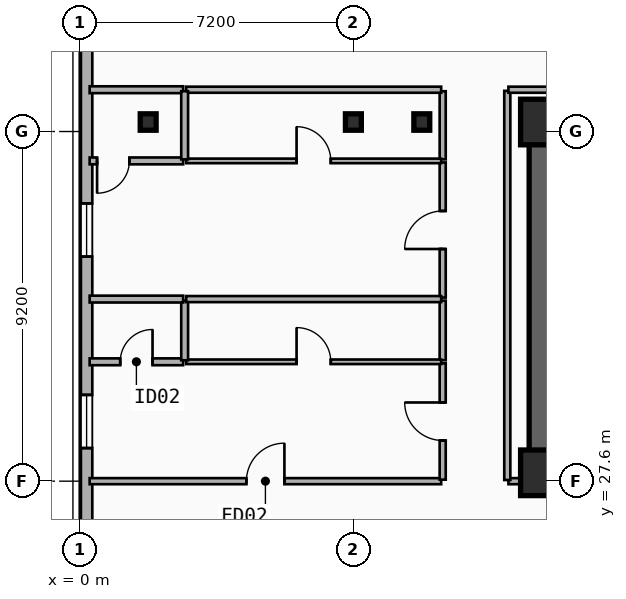
"""IFC4 building model, lengths in metres.
Left out: names, types, materials, properties, quantities, classifications, styles, units other than length and angle.
Written with IfcOpenShell. Run it as: python <this file> out.ifc"""

import sys

from ifc_helpers import new_model, si_unit, direction, frame, frame_2d, origin, origin_2d, place, context, subcontext, project, spatial, rectangle, i_section, extrude, element, fill, save


model = new_model("IFC4")
c1 = context("Model", 3, precision=1e-05, world=origin(), true_north=direction((0.0, 1.0)))
c2 = subcontext(c1, "Body", "Model", "MODEL_VIEW")
j1 = project(units=[si_unit("LENGTHUNIT", "METRE"), si_unit("PLANEANGLEUNIT", "RADIAN")], contexts=[c1])
p1 = place(None, origin())
s1 = spatial("IfcSite", under=j1, at=p1, CompositionType="ELEMENT")
p2 = place(p1, origin())
s2 = spatial("IfcBuilding", under=s1, at=p2, CompositionType="ELEMENT")
p3 = place(p2, frame((0.0, 0.0, 125.8)))
s3 = spatial("IfcBuildingStorey", under=s2, at=p3, CompositionType="ELEMENT", Elevation=125.8)
p4 = place(p3, frame((12.15, 37.05, 0.0), z_axis=(0.0, 0.0, 1.0), x_axis=(1.0, 0.0, 0.0)))
e1 = element("IfcWall", 1, at=p4, inside=s3, PredefinedType="SHEAR", context=c2, shape_type="SweptSolid", body=[
    extrude(rectangle(XDim=33.23, YDim=0.65, at=frame_2d((16.615, 0.0))), origin(), (0.0, 0.0, 1.0), 3.5),
])
p5 = place(p3, frame((21.18, 27.82, 0.0), z_axis=(0.0, 0.0, 1.0), x_axis=(-1.0, 0.0, 0.0)))
e2 = element("IfcWall", 2, at=p5, inside=s3, PredefinedType="SHEAR", context=c2, shape_type="SweptSolid", body=[
    extrude(rectangle(XDim=9.03, YDim=0.65, at=frame_2d((4.515, 0.0))), origin(), (0.0, 0.0, 1.0), 3.5),
])
p6 = place(p5, frame((2.68, 0.0, 0.0)))
e3 = element("IfcOpeningElement", 3, at=p6, cuts=e2, PredefinedType="OPENING", context=c2, shape_type="SweptSolid", body=[
    extrude(rectangle(XDim=1.1, YDim=2.15, at=frame_2d((0.55, 1.075))), frame((0.0, 0.335, 0.0), z_axis=(0.0, -1.0, 0.0), x_axis=(1.0, 0.0, 0.0)), (0.0, 0.0, 1.0), 0.67),
])
p7 = place(p3, frame((12.15, 28.145, 0.0), z_axis=(0.0, 0.0, 1.0), x_axis=(0.0, 1.0, 0.0)))
e4 = element("IfcWall", 4, at=p7, inside=s3, PredefinedType="SHEAR", context=c2, shape_type="SweptSolid", body=[
    extrude(rectangle(XDim=8.58, YDim=0.65, at=frame_2d((4.29, 0.0))), origin(), (0.0, 0.0, 1.0), 3.5),
])
for number, where, z_axis, x_axis in (
    (5, (12.2, 27.82, 0.0), (0.0, 0.0, 1.0), (1.0, 0.0, 0.0)),
    (6, (12.2, 37.05, 0.0), (0.0, 0.0, 1.0), (1.0, 0.0, 0.0)),
):
    element("IfcColumn", number, at=place(p3, frame(where, z_axis=z_axis, x_axis=x_axis)), inside=s3, PredefinedType="COLUMN", context=c2, shape_type="SweptSolid", body=[
        extrude(rectangle(XDim=1.2, YDim=1.2, at=origin_2d()), origin(), (0.0, 0.0, 1.0), 3.5),
    ])
for number, where, z_axis, x_axis in (
    (7, (9.0, 37.05, 0.0), (0.0, 0.0, 1.0), (1.0, 0.0, 0.0)),
    (8, (1.8, 37.05, 0.0), (0.0, 0.0, 1.0), (1.0, 0.0, 0.0)),
    (9, (7.2, 37.05, 0.0), (0.0, 0.0, 1.0), (1.0, 0.0, 0.0)),
):
    element("IfcColumn", number, at=place(p3, frame(where, z_axis=z_axis, x_axis=x_axis)), inside=s3, PredefinedType="COLUMN", context=c2, shape_type="SweptSolid", body=[
        extrude(i_section(OverallWidth=0.418, OverallDepth=0.432, WebThickness=0.035, FlangeThickness=0.056, FilletRadius=0.015, at=origin_2d()), origin(), (0.0, 0.0, 1.0), 3.5),
    ])
p8 = place(p3, frame((0.18, 21.0, 0.0), z_axis=(0.0, 0.0, 1.0), x_axis=(0.0, 1.0, 0.0)))
e10 = element("IfcWall", 10, at=p8, inside=s3, PredefinedType="SOLIDWALL", context=c2, shape_type="SweptSolid", body=[
    extrude(rectangle(XDim=18.0, YDim=0.3, at=frame_2d((9.0, 0.0))), origin(), (0.0, 0.0, 1.0), 3.24),
])
p9 = place(p8, frame((7.47, 0.0, 0.48)))
e11 = element("IfcOpeningElement", 11, at=p9, cuts=e10, PredefinedType="OPENING", context=c2, shape_type="SweptSolid", body=[
    extrude(rectangle(XDim=1.4, YDim=1.8, at=frame_2d((0.7, 0.9))), frame((0.0, 0.16, 0.0), z_axis=(0.0, -1.0, 0.0), x_axis=(1.0, 0.0, 0.0)), (0.0, 0.0, 1.0), 0.32),
])
p10 = place(p8, frame((12.509, 0.0, 0.48)))
e12 = element("IfcOpeningElement", 12, at=p10, cuts=e10, PredefinedType="OPENING", context=c2, shape_type="SweptSolid", body=[
    extrude(rectangle(XDim=1.4, YDim=1.8, at=frame_2d((0.7, 0.9))), frame((0.0, 0.16, 0.0), z_axis=(0.0, -1.0, 0.0), x_axis=(1.0, 0.0, 0.0)), (0.0, 0.0, 1.0), 0.32),
])
p11 = place(p8, frame((0.32, 0.0, 0.65)))
e13 = element("IfcOpeningElement", 13, at=p11, cuts=e10, PredefinedType="OPENING", context=c2, shape_type="SweptSolid", body=[
    extrude(rectangle(XDim=1.4, YDim=1.8, at=frame_2d((0.7, 0.9))), frame((0.0, 0.16, 0.0), z_axis=(0.0, -1.0, 0.0), x_axis=(1.0, 0.0, 0.0)), (0.0, 0.0, 1.0), 0.32),
])
p12 = place(p3, frame((0.26, 27.6, 0.0), z_axis=(0.0, 0.0, 1.0), x_axis=(1.0, 0.0, 0.0)))
e14 = element("IfcWall", 14, at=p12, inside=s3, PredefinedType="PARTITIONING", context=c2, shape_type="SweptSolid", body=[
    extrude(rectangle(XDim=9.25, YDim=0.16, at=frame_2d((4.625, 0.0))), origin(), (0.0, 0.0, 1.0), 2.57),
])
p13 = place(p12, frame((4.125, 0.0, 0.0)))
e15 = element("IfcOpeningElement", 15, at=p13, cuts=e14, PredefinedType="OPENING", context=c2, shape_type="SweptSolid", body=[
    extrude(rectangle(XDim=1.0, YDim=2.15, at=frame_2d((0.5, 1.075))), frame((0.0, 0.09, 0.0), z_axis=(0.0, -1.0, 0.0), x_axis=(1.0, 0.0, 0.0)), (0.0, 0.0, 1.0), 0.18),
])
p14 = place(p3, frame((9.55, 27.64, 0.0), z_axis=(0.0, 0.0, 1.0), x_axis=(0.0, 1.0, 0.0)))
e16 = element("IfcWall", 16, at=p14, inside=s3, PredefinedType="PARTITIONING", context=c2, shape_type="SweptSolid", body=[
    extrude(rectangle(XDim=3.061, YDim=0.16, at=frame_2d((1.531, 0.0))), origin(), (0.0, 0.0, 1.0), 3.24),
])
p15 = place(p14, frame((1.031, 0.0, 0.0)))
e17 = element("IfcOpeningElement", 17, at=p15, cuts=e16, PredefinedType="OPENING", context=c2, shape_type="SweptSolid", body=[
    extrude(rectangle(XDim=1.0, YDim=2.15, at=frame_2d((0.5, 1.075))), frame((0.0, 0.09, 0.0), z_axis=(0.0, -1.0, 0.0), x_axis=(1.0, 0.0, 0.0)), (0.0, 0.0, 1.0), 0.18),
])
p16 = place(p3, frame((9.55, 30.781, 0.0), z_axis=(0.0, 0.0, 1.0), x_axis=(0.0, 1.0, 0.0)))
e18 = element("IfcWall", 18, at=p16, inside=s3, PredefinedType="PARTITIONING", context=c2, shape_type="SweptSolid", body=[
    extrude(rectangle(XDim=1.57, YDim=0.16, at=frame_2d((0.785, 0.0))), origin(), (0.0, 0.0, 1.0), 3.24),
])
p17 = place(p3, frame((9.55, 32.431, 0.0), z_axis=(0.0, 0.0, 1.0), x_axis=(0.0, 1.0, 0.0)))
e19 = element("IfcWall", 19, at=p17, inside=s3, PredefinedType="PARTITIONING", context=c2, shape_type="SweptSolid", body=[
    extrude(rectangle(XDim=3.556, YDim=0.16, at=frame_2d((1.778, 0.0))), origin(), (0.0, 0.0, 1.0), 3.24),
])
p18 = place(p17, frame((1.278, 0.0, 0.0)))
e20 = element("IfcOpeningElement", 20, at=p18, cuts=e19, PredefinedType="OPENING", context=c2, shape_type="SweptSolid", body=[
    extrude(rectangle(XDim=1.0, YDim=2.15, at=frame_2d((0.5, 1.075))), frame((0.0, 0.09, 0.0), z_axis=(0.0, -1.0, 0.0), x_axis=(1.0, 0.0, 0.0)), (0.0, 0.0, 1.0), 0.18),
])
p19 = place(p3, frame((9.55, 36.067, 0.0), z_axis=(0.0, 0.0, 1.0), x_axis=(0.0, 1.0, 0.0)))
e21 = element("IfcWall", 21, at=p19, inside=s3, PredefinedType="PARTITIONING", context=c2, shape_type="SweptSolid", body=[
    extrude(rectangle(XDim=1.793, YDim=0.16, at=frame_2d((0.896, 0.0))), origin(), (0.0, 0.0, 1.0), 2.72),
])
p20 = place(p3, frame((0.26, 37.9, 0.0), z_axis=(0.0, 0.0, 1.0), x_axis=(1.0, 0.0, 0.0)))
e22 = element("IfcWall", 22, at=p20, inside=s3, PredefinedType="PLUMBINGWALL", context=c2, shape_type="SweptSolid", body=[
    extrude(rectangle(XDim=2.46, YDim=0.18, at=frame_2d((1.23, 0.0))), origin(), (0.0, 0.0, 1.0), 3.24),
])
p21 = place(p3, frame((2.8, 37.9, 0.0), z_axis=(0.0, 0.0, 1.0), x_axis=(1.0, 0.0, 0.0)))
e23 = element("IfcWall", 23, at=p21, inside=s3, PredefinedType="PARTITIONING", context=c2, shape_type="SweptSolid", body=[
    extrude(rectangle(XDim=6.71, YDim=0.16, at=frame_2d((3.355, 0.0))), origin(), (0.0, 0.0, 1.0), 3.24),
])
p22 = place(p3, frame((0.26, 30.741, 0.0), z_axis=(0.0, 0.0, 1.0), x_axis=(1.0, 0.0, 0.0)))
e24 = element("IfcWall", 24, at=p22, inside=s3, PredefinedType="PLUMBINGWALL", context=c2, shape_type="SweptSolid", body=[
    extrude(rectangle(XDim=2.46, YDim=0.18, at=frame_2d((1.23, 0.0))), origin(), (0.0, 0.0, 1.0), 2.57),
])
p23 = place(p22, frame((0.805, 0.0, 0.0)))
e25 = element("IfcOpeningElement", 25, at=p23, cuts=e24, PredefinedType="OPENING", context=c2, shape_type="SweptSolid", body=[
    extrude(rectangle(XDim=0.85, YDim=2.1, at=frame_2d((0.425, 1.05))), frame((0.0, 0.1, 0.0), z_axis=(0.0, -1.0, 0.0), x_axis=(1.0, 0.0, 0.0)), (0.0, 0.0, 1.0), 0.2),
])
p24 = place(p3, frame((2.8, 30.741, 0.0), z_axis=(0.0, 0.0, 1.0), x_axis=(1.0, 0.0, 0.0)))
e26 = element("IfcWall", 26, at=p24, inside=s3, PredefinedType="PARTITIONING", context=c2, shape_type="SweptSolid", body=[
    extrude(rectangle(XDim=6.71, YDim=0.12, at=frame_2d((3.355, 0.0))), origin(), (0.0, 0.0, 1.0), 2.57),
])
p25 = place(p24, frame((2.905, 0.0, 0.0)))
e27 = element("IfcOpeningElement", 27, at=p25, cuts=e26, PredefinedType="OPENING", context=c2, shape_type="SweptSolid", body=[
    extrude(rectangle(XDim=0.9, YDim=2.1, at=frame_2d((0.45, 1.05))), frame((0.0, 0.07, 0.0), z_axis=(0.0, -1.0, 0.0), x_axis=(1.0, 0.0, 0.0)), (0.0, 0.0, 1.0), 0.14),
])
p26 = place(p3, frame((2.76, 30.781, 0.0), z_axis=(0.0, 0.0, 1.0), x_axis=(0.0, 1.0, 0.0)))
e28 = element("IfcWall", 28, at=p26, inside=s3, PredefinedType="PLUMBINGWALL", context=c2, shape_type="SweptSolid", body=[
    extrude(rectangle(XDim=1.57, YDim=0.18, at=frame_2d((0.785, 0.0))), origin(), (0.0, 0.0, 1.0), 3.24),
])
p27 = place(p3, frame((0.26, 32.391, 0.0), z_axis=(0.0, 0.0, 1.0), x_axis=(1.0, 0.0, 0.0)))
e29 = element("IfcWall", 29, at=p27, inside=s3, PredefinedType="PLUMBINGWALL", context=c2, shape_type="SweptSolid", body=[
    extrude(rectangle(XDim=2.46, YDim=0.18, at=frame_2d((1.23, 0.0))), origin(), (0.0, 0.0, 1.0), 2.57),
])
p28 = place(p3, frame((2.8, 32.391, 0.0), z_axis=(0.0, 0.0, 1.0), x_axis=(1.0, 0.0, 0.0)))
e30 = element("IfcWall", 30, at=p28, inside=s3, PredefinedType="PARTITIONING", context=c2, shape_type="SweptSolid", body=[
    extrude(rectangle(XDim=6.71, YDim=0.16, at=frame_2d((3.355, 0.0))), origin(), (0.0, 0.0, 1.0), 2.57),
])
p29 = place(p3, frame((2.72, 36.027, 0.0), z_axis=(0.0, 0.0, 1.0), x_axis=(-1.0, 0.0, 0.0)))
e31 = element("IfcWall", 31, at=p29, inside=s3, PredefinedType="PLUMBINGWALL", context=c2, shape_type="SweptSolid", body=[
    extrude(rectangle(XDim=2.46, YDim=0.18, at=frame_2d((1.23, 0.0))), origin(), (0.0, 0.0, 1.0), 2.57),
])
p30 = place(p29, frame((1.415, 0.0, 0.0)))
e32 = element("IfcOpeningElement", 32, at=p30, cuts=e31, PredefinedType="OPENING", context=c2, shape_type="SweptSolid", body=[
    extrude(rectangle(XDim=0.85, YDim=2.1, at=frame_2d((0.425, 1.05))), frame((0.0, 0.1, 0.0), z_axis=(0.0, -1.0, 0.0), x_axis=(1.0, 0.0, 0.0)), (0.0, 0.0, 1.0), 0.2),
])
p31 = place(p3, frame((2.8, 36.027, 0.0), z_axis=(0.0, 0.0, 1.0), x_axis=(1.0, 0.0, 0.0)))
e33 = element("IfcWall", 33, at=p31, inside=s3, PredefinedType="PARTITIONING", context=c2, shape_type="SweptSolid", body=[
    extrude(rectangle(XDim=6.71, YDim=0.12, at=frame_2d((3.355, 0.0))), origin(), (0.0, 0.0, 1.0), 2.57),
])
p32 = place(p31, frame((2.905, 0.0, 0.0)))
e34 = element("IfcOpeningElement", 34, at=p32, cuts=e33, PredefinedType="OPENING", context=c2, shape_type="SweptSolid", body=[
    extrude(rectangle(XDim=0.9, YDim=2.1, at=frame_2d((0.45, 1.05))), frame((0.0, 0.07, 0.0), z_axis=(0.0, -1.0, 0.0), x_axis=(1.0, 0.0, 0.0)), (0.0, 0.0, 1.0), 0.14),
])
p33 = place(p3, frame((2.76, 36.067, 0.0), z_axis=(0.0, 0.0, 1.0), x_axis=(0.0, 1.0, 0.0)))
e35 = element("IfcWall", 35, at=p33, inside=s3, PredefinedType="PLUMBINGWALL", context=c2, shape_type="SweptSolid", body=[
    extrude(rectangle(XDim=1.793, YDim=0.18, at=frame_2d((0.896, 0.0))), origin(), (0.0, 0.0, 1.0), 2.72),
])
p34 = place(p3, frame((11.28, 27.6, 0.0), z_axis=(0.0, 0.0, 1.0), x_axis=(1.0, 0.0, 0.0)))
e36 = element("IfcWall", 36, at=p34, inside=s3, PredefinedType="PARTITIONING", context=c2, shape_type="SweptSolid", body=[
    extrude(rectangle(XDim=0.84, YDim=0.16, at=frame_2d((0.42, 0.0))), origin(), (0.0, 0.0, 1.0), 2.28),
])
p35 = place(p3, frame((11.25, 27.63, 0.0), z_axis=(0.0, 0.0, 1.0), x_axis=(0.0, 1.0, 0.0)))
e37 = element("IfcWall", 37, at=p35, inside=s3, PredefinedType="PARTITIONING", context=c2, shape_type="SweptSolid", body=[
    extrude(rectangle(XDim=10.24, YDim=0.16, at=frame_2d((5.12, 0.0))), origin(), (0.0, 0.0, 1.0), 2.72),
])
p36 = place(p3, frame((11.28, 37.9, 0.0), z_axis=(0.0, 0.0, 1.0), x_axis=(1.0, 0.0, 0.0)))
e38 = element("IfcWall", 38, at=p36, inside=s3, PredefinedType="PARTITIONING", context=c2, shape_type="SweptSolid", body=[
    extrude(rectangle(XDim=35.04, YDim=0.16, at=frame_2d((17.52, 0.0))), origin(), (0.0, 0.0, 1.0), 3.24),
])
p37 = place(p9, origin())
e39 = element("IfcWindow", 39, at=p37, inside=s3, PartitioningType="SINGLE_PANEL", PredefinedType="WINDOW", context=c2, shape_type="SweptSolid", body=[
    extrude(rectangle(XDim=1.4, YDim=1.8, at=frame_2d((0.7, 0.9))), frame((0.0, 0.03, 0.0), z_axis=(0.0, -1.0, 0.0), x_axis=(1.0, 0.0, 0.0)), (0.0, 0.0, 1.0), 0.06),
])
fill(e11, e39)
p38 = place(p10, origin())
e40 = element("IfcWindow", 40, at=p38, inside=s3, PartitioningType="SINGLE_PANEL", PredefinedType="WINDOW", context=c2, shape_type="SweptSolid", body=[
    extrude(rectangle(XDim=1.4, YDim=1.8, at=frame_2d((0.7, 0.9))), frame((0.0, 0.03, 0.0), z_axis=(0.0, -1.0, 0.0), x_axis=(1.0, 0.0, 0.0)), (0.0, 0.0, 1.0), 0.06),
])
fill(e12, e40)
p39 = place(p13, origin())
e41 = element("IfcDoor", 41, at=p39, inside=s3, OperationType="SINGLE_SWING_RIGHT", PredefinedType="DOOR", context=c2, shape_type="SweptSolid", body=[
    extrude(rectangle(XDim=1.0, YDim=2.15, at=frame_2d((0.5, 1.075))), frame((0.0, 0.025, 0.0), z_axis=(0.0, -1.0, 0.0), x_axis=(1.0, 0.0, 0.0)), (0.0, 0.0, 1.0), 0.05),
])
fill(e15, e41)
p40 = place(p15, origin())
e42 = element("IfcDoor", 42, at=p40, inside=s3, OperationType="SINGLE_SWING_RIGHT", PredefinedType="DOOR", context=c2, shape_type="SweptSolid", body=[
    extrude(rectangle(XDim=1.0, YDim=2.15, at=frame_2d((0.5, 1.075))), frame((0.0, 0.025, 0.0), z_axis=(0.0, -1.0, 0.0), x_axis=(1.0, 0.0, 0.0)), (0.0, 0.0, 1.0), 0.05),
])
fill(e17, e42)
p41 = place(p18, origin())
e43 = element("IfcDoor", 43, at=p41, inside=s3, OperationType="SINGLE_SWING_LEFT", PredefinedType="DOOR", context=c2, shape_type="SweptSolid", body=[
    extrude(rectangle(XDim=1.0, YDim=2.15, at=frame_2d((0.5, 1.075))), frame((0.0, 0.025, 0.0), z_axis=(0.0, -1.0, 0.0), x_axis=(1.0, 0.0, 0.0)), (0.0, 0.0, 1.0), 0.05),
])
fill(e20, e43)
p42 = place(p23, origin())
e44 = element("IfcDoor", 44, at=p42, inside=s3, OperationType="SINGLE_SWING_RIGHT", PredefinedType="DOOR", context=c2, shape_type="SweptSolid", body=[
    extrude(rectangle(XDim=0.85, YDim=2.1, at=frame_2d((0.425, 1.05))), frame((0.0, 0.025, 0.0), z_axis=(0.0, -1.0, 0.0), x_axis=(1.0, 0.0, 0.0)), (0.0, 0.0, 1.0), 0.05),
])
fill(e25, e44)
p43 = place(p25, origin())
e45 = element("IfcDoor", 45, at=p43, inside=s3, OperationType="SINGLE_SWING_LEFT", PredefinedType="DOOR", context=c2, shape_type="SweptSolid", body=[
    extrude(rectangle(XDim=0.9, YDim=2.1, at=frame_2d((0.45, 1.05))), frame((0.0, 0.025, 0.0), z_axis=(0.0, -1.0, 0.0), x_axis=(1.0, 0.0, 0.0)), (0.0, 0.0, 1.0), 0.05),
])
fill(e27, e45)
p44 = place(p30, origin())
e46 = element("IfcDoor", 46, at=p44, inside=s3, OperationType="SINGLE_SWING_RIGHT", PredefinedType="DOOR", context=c2, shape_type="SweptSolid", body=[
    extrude(rectangle(XDim=0.85, YDim=2.1, at=frame_2d((0.425, 1.05))), frame((0.0, 0.025, 0.0), z_axis=(0.0, -1.0, 0.0), x_axis=(1.0, 0.0, 0.0)), (0.0, 0.0, 1.0), 0.05),
])
fill(e32, e46)
p45 = place(p32, origin())
e47 = element("IfcDoor", 47, at=p45, inside=s3, OperationType="SINGLE_SWING_LEFT", PredefinedType="DOOR", context=c2, shape_type="SweptSolid", body=[
    extrude(rectangle(XDim=0.9, YDim=2.1, at=frame_2d((0.45, 1.05))), frame((0.0, 0.025, 0.0), z_axis=(0.0, -1.0, 0.0), x_axis=(1.0, 0.0, 0.0)), (0.0, 0.0, 1.0), 0.05),
])
fill(e34, e47)
save(model, sys.argv[1])
